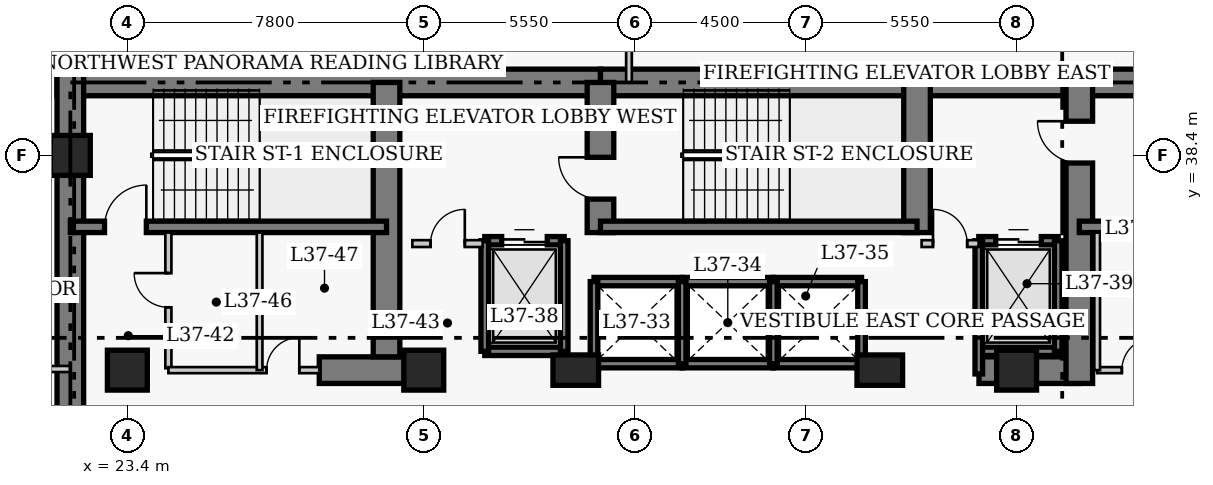
"""IFC4 building model, lengths in metres.
Left out: names, types, materials, properties, quantities, classifications, styles, units other than length and angle.
Written with IfcOpenShell. Run it as: python <this file> out.ifc"""

import sys

from ifc_helpers import new_model, si_unit, direction, frame, frame_2d, origin, origin_2d, place, context, subcontext, project, spatial, rectangle, extrude, element, fill, save


model = new_model("IFC4")
c1 = context("Model", 3, precision=1e-05, world=origin(), true_north=direction((0.0, 1.0)))
c2 = subcontext(c1, "Body", "Model", "MODEL_VIEW")
j1 = project(units=[si_unit("LENGTHUNIT", "METRE"), si_unit("PLANEANGLEUNIT", "RADIAN")], contexts=[c1])
p1 = place(None, origin())
s1 = spatial("IfcSite", under=j1, at=p1, CompositionType="ELEMENT")
p2 = place(p1, origin())
s2 = spatial("IfcBuilding", under=s1, at=p2, CompositionType="ELEMENT")
p3 = place(p2, frame((0.0, 0.0, 149.8)))
s3 = spatial("IfcBuildingStorey", under=s2, at=p3, CompositionType="ELEMENT", Elevation=149.8)
p4 = place(p3, frame((21.55, 40.32, 0.0), z_axis=(0.0, 0.0, 1.0), x_axis=(1.0, 0.0, 0.0)))
e1 = element("IfcWall", 1, at=p4, inside=s3, PredefinedType="SHEAR", context=c2, shape_type="SweptSolid", body=[
    extrude(rectangle(XDim=14.3, YDim=0.7, at=frame_2d((7.15, 0.0))), origin(), (0.0, 0.0, 1.0), 3.8),
])
p5 = place(p3, frame((35.85, 40.32, 0.0), z_axis=(0.0, 0.0, 1.0), x_axis=(1.0, 0.0, 0.0)))
e2 = element("IfcWall", 2, at=p5, inside=s3, PredefinedType="SHEAR", context=c2, shape_type="SweptSolid", body=[
    extrude(rectangle(XDim=12.6, YDim=0.7, at=frame_2d((6.3, 0.0))), origin(), (0.0, 0.0, 1.0), 3.8),
])
p6 = place(p3, frame((48.45, 40.32, 0.0), z_axis=(0.0, 0.0, 1.0), x_axis=(1.0, 0.0, 0.0)))
e3 = element("IfcWall", 3, at=p6, inside=s3, PredefinedType="SHEAR", context=c2, shape_type="SweptSolid", body=[
    extrude(rectangle(XDim=8.77, YDim=0.7, at=frame_2d((4.385, 0.0))), origin(), (0.0, 0.0, 1.0), 3.8),
])
p7 = place(p3, frame((21.9, 27.05, 0.0), z_axis=(0.0, 0.0, 1.0), x_axis=(0.0, 1.0, 0.0)))
e4 = element("IfcWall", 4, at=p7, inside=s3, PredefinedType="SHEAR", context=c2, shape_type="SweptSolid", body=[
    extrude(rectangle(XDim=13.62, YDim=0.7, at=frame_2d((6.81, 0.0))), origin(), (0.0, 0.0, 1.0), 3.8),
])
p8 = place(p3, frame((28.45, 32.75, 0.0), z_axis=(0.0, 0.0, 1.0), x_axis=(1.0, 0.0, 0.0)))
e5 = element("IfcWall", 5, at=p8, inside=s3, PredefinedType="SHEAR", context=c2, shape_type="SweptSolid", body=[
    extrude(rectangle(XDim=2.4, YDim=0.7, at=frame_2d((1.2, 0.0))), origin(), (0.0, 0.0, 1.0), 3.8),
])
p9 = place(p3, frame((45.81, 32.75, 0.0), z_axis=(0.0, 0.0, 1.0), x_axis=(1.0, 0.0, 0.0)))
e6 = element("IfcWall", 6, at=p9, inside=s3, PredefinedType="SHEAR", context=c2, shape_type="SweptSolid", body=[
    extrude(rectangle(XDim=2.64, YDim=0.7, at=frame_2d((1.32, 0.0))), origin(), (0.0, 0.0, 1.0), 3.8),
])
p10 = place(p3, frame((30.22, 33.1, 0.0), z_axis=(0.0, 0.0, 1.0), x_axis=(0.0, 1.0, 0.0)))
e7 = element("IfcWall", 7, at=p10, inside=s3, PredefinedType="SHEAR", context=c2, shape_type="SweptSolid", body=[
    extrude(rectangle(XDim=7.22, YDim=0.7, at=frame_2d((3.61, 0.0))), origin(), (0.0, 0.0, 1.0), 3.8),
])
p11 = place(p3, frame((35.85, 36.37, 0.0), z_axis=(0.0, 0.0, 1.0), x_axis=(0.0, 1.0, 0.0)))
e8 = element("IfcWall", 8, at=p11, inside=s3, PredefinedType="SHEAR", context=c2, shape_type="SweptSolid", body=[
    extrude(rectangle(XDim=3.95, YDim=0.7, at=frame_2d((1.975, 0.0))), origin(), (0.0, 0.0, 1.0), 3.8),
])
p12 = place(p11, frame((0.88, 0.0, 0.0)))
e9 = element("IfcOpeningElement", 9, at=p12, cuts=e8, PredefinedType="OPENING", context=c2, shape_type="SweptSolid", body=[
    extrude(rectangle(XDim=1.1, YDim=2.15, at=frame_2d((0.55, 1.075))), frame((0.0, 0.36, 0.0), z_axis=(0.0, -1.0, 0.0), x_axis=(1.0, 0.0, 0.0)), (0.0, 0.0, 1.0), 0.72),
])
p13 = place(p3, frame((44.18, 36.37, 0.0), z_axis=(0.0, 0.0, 1.0), x_axis=(0.0, 1.0, 0.0)))
e10 = element("IfcWall", 10, at=p13, inside=s3, PredefinedType="SHEAR", context=c2, shape_type="SweptSolid", body=[
    extrude(rectangle(XDim=3.95, YDim=0.7, at=frame_2d((1.975, 0.0))), origin(), (0.0, 0.0, 1.0), 3.8),
])
p14 = place(p3, frame((48.45, 32.4, 0.0), z_axis=(0.0, 0.0, 1.0), x_axis=(0.0, 1.0, 0.0)))
e11 = element("IfcWall", 11, at=p14, inside=s3, PredefinedType="SHEAR", context=c2, shape_type="SweptSolid", body=[
    extrude(rectangle(XDim=7.92, YDim=0.7, at=frame_2d((3.96, 0.0))), origin(), (0.0, 0.0, 1.0), 3.8),
])
p15 = place(p14, frame((5.8, 0.0, 0.0)))
e12 = element("IfcOpeningElement", 12, at=p15, cuts=e11, PredefinedType="OPENING", context=c2, shape_type="SweptSolid", body=[
    extrude(rectangle(XDim=1.1, YDim=2.15, at=frame_2d((0.55, 1.075))), frame((0.0, 0.36, 0.0), z_axis=(0.0, -1.0, 0.0), x_axis=(1.0, 0.0, 0.0)), (0.0, 0.0, 1.0), 0.72),
])
p16 = place(p3, frame((21.9, 36.52, 0.0), z_axis=(0.0, 0.0, 1.0), x_axis=(1.0, 0.0, 0.0)))
e13 = element("IfcWall", 13, at=p16, inside=s3, PredefinedType="SHEAR", context=c2, shape_type="SweptSolid", body=[
    extrude(rectangle(XDim=8.32, YDim=0.3, at=frame_2d((4.16, 0.0))), origin(), (0.0, 0.0, 1.0), 3.8),
])
p17 = place(p16, frame((0.9, 0.0, 0.0)))
e14 = element("IfcOpeningElement", 14, at=p17, cuts=e13, PredefinedType="OPENING", context=c2, shape_type="SweptSolid", body=[
    extrude(rectangle(XDim=1.1, YDim=2.15, at=frame_2d((0.55, 1.075))), frame((0.0, 0.16, 0.0), z_axis=(0.0, -1.0, 0.0), x_axis=(1.0, 0.0, 0.0)), (0.0, 0.0, 1.0), 0.32),
])
p18 = place(p3, frame((35.85, 36.52, 0.0), z_axis=(0.0, 0.0, 1.0), x_axis=(1.0, 0.0, 0.0)))
e15 = element("IfcWall", 15, at=p18, inside=s3, PredefinedType="SHEAR", context=c2, shape_type="SweptSolid", body=[
    extrude(rectangle(XDim=8.33, YDim=0.3, at=frame_2d((4.165, 0.0))), origin(), (0.0, 0.0, 1.0), 3.8),
])
p19 = place(p3, frame((48.45, 36.52, 0.0), z_axis=(0.0, 0.0, 1.0), x_axis=(1.0, 0.0, 0.0)))
e16 = element("IfcWall", 16, at=p19, inside=s3, PredefinedType="SHEAR", context=c2, shape_type="SweptSolid", body=[
    extrude(rectangle(XDim=8.42, YDim=0.3, at=frame_2d((4.21, 0.0))), origin(), (0.0, 0.0, 1.0), 3.8),
])
for number, where, z_axis, x_axis in (
    (17, (21.9, 38.4, 0.0), (0.0, 0.0, 1.0), (1.0, 0.0, 0.0)),
    (18, (23.4, 32.75, 0.0), (0.0, 0.0, 1.0), (1.0, 0.0, 0.0)),
    (19, (31.2, 32.75, 0.0), (0.0, 0.0, 1.0), (1.0, 0.0, 0.0)),
):
    element("IfcColumn", number, at=place(p3, frame(where, z_axis=z_axis, x_axis=x_axis)), inside=s3, PredefinedType="COLUMN", context=c2, shape_type="SweptSolid", body=[
        extrude(rectangle(XDim=1.05, YDim=1.05, at=origin_2d()), origin(), (0.0, 0.0, 1.0), 3.8),
    ])
for number, where, z_axis, x_axis in (
    (20, (35.2, 32.75, 0.0), (0.0, 0.0, 1.0), (1.0, 0.0, 0.0)),
    (21, (43.2, 32.75, 0.0), (0.0, 0.0, 1.0), (1.0, 0.0, 0.0)),
):
    element("IfcColumn", number, at=place(p3, frame(where, z_axis=z_axis, x_axis=x_axis)), inside=s3, PredefinedType="COLUMN", context=c2, shape_type="SweptSolid", body=[
        extrude(rectangle(XDim=1.2, YDim=0.8, at=origin_2d()), origin(), (0.0, 0.0, 1.0), 3.8),
    ])
p20 = place(p3, frame((46.8, 32.75, 0.0), z_axis=(0.0, 0.0, 1.0), x_axis=(1.0, 0.0, 0.0)))
e22 = element("IfcColumn", 22, at=p20, inside=s3, PredefinedType="COLUMN", context=c2, shape_type="SweptSolid", body=[
    extrude(rectangle(XDim=1.05, YDim=1.05, at=origin_2d()), origin(), (0.0, 0.0, 1.0), 3.8),
])
for number, where, z_axis, x_axis in (
    (23, (35.68, 35.08, 0.0), (0.0, 0.0, 1.0), (1.0, 0.0, 0.0)),
    (24, (35.68, 32.92, 0.0), (0.0, 0.0, 1.0), (1.0, 0.0, 0.0)),
):
    element("IfcWall", number, at=place(p3, frame(where, z_axis=z_axis, x_axis=x_axis)), inside=s3, PredefinedType="SHEAR", context=c2, shape_type="SweptSolid", body=[
        extrude(rectangle(XDim=2.32, YDim=0.22, at=frame_2d((1.16, 0.0))), origin(), (0.0, 0.0, 1.0), 3.8),
    ])
p21 = place(p3, frame((35.68, 32.92, 0.0), z_axis=(0.0, 0.0, 1.0), x_axis=(0.0, 1.0, 0.0)))
e25 = element("IfcWall", 25, at=p21, inside=s3, PredefinedType="SHEAR", context=c2, shape_type="SweptSolid", body=[
    extrude(rectangle(XDim=2.16, YDim=0.2, at=frame_2d((1.08, 0.0))), origin(), (0.0, 0.0, 1.0), 3.8),
])
for number, where, z_axis, x_axis in (
    (26, (38.0, 35.08, 0.0), (0.0, 0.0, 1.0), (1.0, 0.0, 0.0)),
    (27, (38.0, 32.92, 0.0), (0.0, 0.0, 1.0), (1.0, 0.0, 0.0)),
):
    element("IfcWall", number, at=place(p3, frame(where, z_axis=z_axis, x_axis=x_axis)), inside=s3, PredefinedType="SHEAR", context=c2, shape_type="SweptSolid", body=[
        extrude(rectangle(XDim=2.4, YDim=0.22, at=frame_2d((1.2, 0.0))), origin(), (0.0, 0.0, 1.0), 3.8),
    ])
p22 = place(p3, frame((38.0, 32.92, 0.0), z_axis=(0.0, 0.0, 1.0), x_axis=(0.0, 1.0, 0.0)))
e28 = element("IfcWall", 28, at=p22, inside=s3, PredefinedType="SHEAR", context=c2, shape_type="SweptSolid", body=[
    extrude(rectangle(XDim=2.16, YDim=0.2, at=frame_2d((1.08, 0.0))), origin(), (0.0, 0.0, 1.0), 3.8),
])
for number, where, z_axis, x_axis in (
    (29, (40.4, 35.08, 0.0), (0.0, 0.0, 1.0), (1.0, 0.0, 0.0)),
    (30, (40.4, 32.92, 0.0), (0.0, 0.0, 1.0), (1.0, 0.0, 0.0)),
):
    element("IfcWall", number, at=place(p3, frame(where, z_axis=z_axis, x_axis=x_axis)), inside=s3, PredefinedType="SHEAR", context=c2, shape_type="SweptSolid", body=[
        extrude(rectangle(XDim=2.32, YDim=0.22, at=frame_2d((1.16, 0.0))), origin(), (0.0, 0.0, 1.0), 3.8),
    ])
for number, where, z_axis, x_axis in (
    (31, (40.4, 32.92, 0.0), (0.0, 0.0, 1.0), (0.0, 1.0, 0.0)),
    (32, (42.72, 32.92, 0.0), (0.0, 0.0, 1.0), (0.0, 1.0, 0.0)),
):
    element("IfcWall", number, at=place(p3, frame(where, z_axis=z_axis, x_axis=x_axis)), inside=s3, PredefinedType="SHEAR", context=c2, shape_type="SweptSolid", body=[
        extrude(rectangle(XDim=2.16, YDim=0.2, at=frame_2d((1.08, 0.0))), origin(), (0.0, 0.0, 1.0), 3.8),
    ])
p23 = place(p3, frame((32.805, 36.155, 0.0), z_axis=(0.0, 0.0, 1.0), x_axis=(1.0, 0.0, 0.0)))
e33 = element("IfcWall", 33, at=p23, inside=s3, PredefinedType="SHEAR", context=c2, shape_type="SweptSolid", body=[
    extrude(rectangle(XDim=2.09, YDim=0.22, at=frame_2d((1.045, 0.0))), origin(), (0.0, 0.0, 1.0), 3.8),
])
p24 = place(p23, frame((0.445, 0.0, 0.0)))
e34 = element("IfcOpeningElement", 34, at=p24, cuts=e33, PredefinedType="OPENING", context=c2, shape_type="SweptSolid", body=[
    extrude(rectangle(XDim=1.2, YDim=2.15, at=frame_2d((0.6, 1.075))), frame((0.0, 0.12, 0.0), z_axis=(0.0, -1.0, 0.0), x_axis=(1.0, 0.0, 0.0)), (0.0, 0.0, 1.0), 0.24),
])
p25 = place(p3, frame((32.805, 33.245, 0.0), z_axis=(0.0, 0.0, 1.0), x_axis=(1.0, 0.0, 0.0)))
e35 = element("IfcWall", 35, at=p25, inside=s3, PredefinedType="SHEAR", context=c2, shape_type="SweptSolid", body=[
    extrude(rectangle(XDim=2.09, YDim=0.22, at=frame_2d((1.045, 0.0))), origin(), (0.0, 0.0, 1.0), 3.8),
])
for number, where, z_axis, x_axis in (
    (36, (32.805, 33.245, 0.0), (0.0, 0.0, 1.0), (0.0, 1.0, 0.0)),
    (37, (34.895, 33.245, 0.0), (0.0, 0.0, 1.0), (0.0, 1.0, 0.0)),
):
    element("IfcWall", number, at=place(p3, frame(where, z_axis=z_axis, x_axis=x_axis)), inside=s3, PredefinedType="SHEAR", context=c2, shape_type="SweptSolid", body=[
        extrude(rectangle(XDim=2.91, YDim=0.2, at=frame_2d((1.455, 0.0))), origin(), (0.0, 0.0, 1.0), 3.8),
    ])
p26 = place(p3, frame((45.805, 36.155, 0.0), z_axis=(0.0, 0.0, 1.0), x_axis=(1.0, 0.0, 0.0)))
e38 = element("IfcWall", 38, at=p26, inside=s3, PredefinedType="SHEAR", context=c2, shape_type="SweptSolid", body=[
    extrude(rectangle(XDim=2.09, YDim=0.22, at=frame_2d((1.045, 0.0))), origin(), (0.0, 0.0, 1.0), 3.8),
])
p27 = place(p26, frame((0.445, 0.0, 0.0)))
e39 = element("IfcOpeningElement", 39, at=p27, cuts=e38, PredefinedType="OPENING", context=c2, shape_type="SweptSolid", body=[
    extrude(rectangle(XDim=1.2, YDim=2.15, at=frame_2d((0.6, 1.075))), frame((0.0, 0.12, 0.0), z_axis=(0.0, -1.0, 0.0), x_axis=(1.0, 0.0, 0.0)), (0.0, 0.0, 1.0), 0.24),
])
p28 = place(p3, frame((45.805, 33.245, 0.0), z_axis=(0.0, 0.0, 1.0), x_axis=(1.0, 0.0, 0.0)))
e40 = element("IfcWall", 40, at=p28, inside=s3, PredefinedType="SHEAR", context=c2, shape_type="SweptSolid", body=[
    extrude(rectangle(XDim=2.09, YDim=0.22, at=frame_2d((1.045, 0.0))), origin(), (0.0, 0.0, 1.0), 3.8),
])
p29 = place(p3, frame((45.805, 32.65, 0.0), z_axis=(0.0, 0.0, 1.0), x_axis=(0.0, 1.0, 0.0)))
e41 = element("IfcWall", 41, at=p29, inside=s3, PredefinedType="SHEAR", context=c2, shape_type="SweptSolid", body=[
    extrude(rectangle(XDim=3.505, YDim=0.2, at=frame_2d((1.752, 0.0))), origin(), (0.0, 0.0, 1.0), 3.8),
])
p30 = place(p3, frame((47.895, 33.245, 0.0), z_axis=(0.0, 0.0, 1.0), x_axis=(0.0, 1.0, 0.0)))
e42 = element("IfcWall", 42, at=p30, inside=s3, PredefinedType="SHEAR", context=c2, shape_type="SweptSolid", body=[
    extrude(rectangle(XDim=2.91, YDim=0.2, at=frame_2d((1.455, 0.0))), origin(), (0.0, 0.0, 1.0), 3.8),
])
p31 = place(p3, frame((30.9, 36.08, 0.0), z_axis=(0.0, 0.0, 1.0), x_axis=(1.0, 0.0, 0.0)))
e43 = element("IfcWall", 43, at=p31, inside=s3, PredefinedType="PARTITIONING", context=c2, shape_type="SweptSolid", body=[
    extrude(rectangle(XDim=1.85, YDim=0.18, at=frame_2d((0.925, 0.0))), origin(), (0.0, 0.0, 1.0), 3.55),
])
p32 = place(p31, frame((0.48, 0.0, 0.0)))
e44 = element("IfcOpeningElement", 44, at=p32, cuts=e43, PredefinedType="OPENING", context=c2, shape_type="SweptSolid", body=[
    extrude(rectangle(XDim=0.9, YDim=2.15, at=frame_2d((0.45, 1.075))), frame((0.0, 0.1, 0.0), z_axis=(0.0, -1.0, 0.0), x_axis=(1.0, 0.0, 0.0)), (0.0, 0.0, 1.0), 0.2),
])
p33 = place(p3, frame((44.3, 36.08, 0.0), z_axis=(0.0, 0.0, 1.0), x_axis=(1.0, 0.0, 0.0)))
e45 = element("IfcWall", 45, at=p33, inside=s3, PredefinedType="PARTITIONING", context=c2, shape_type="SweptSolid", body=[
    extrude(rectangle(XDim=1.5, YDim=0.18, at=frame_2d((0.75, 0.0))), origin(), (0.0, 0.0, 1.0), 3.55),
])
p34 = place(p33, frame((0.3, 0.0, 0.0)))
e46 = element("IfcOpeningElement", 46, at=p34, cuts=e45, PredefinedType="OPENING", context=c2, shape_type="SweptSolid", body=[
    extrude(rectangle(XDim=0.9, YDim=2.15, at=frame_2d((0.45, 1.075))), frame((0.0, 0.1, 0.0), z_axis=(0.0, -1.0, 0.0), x_axis=(1.0, 0.0, 0.0)), (0.0, 0.0, 1.0), 0.2),
])
p35 = place(p3, frame((24.48, 32.8, 0.0), z_axis=(0.0, 0.0, 1.0), x_axis=(0.0, 1.0, 0.0)))
e47 = element("IfcWall", 47, at=p35, inside=s3, PredefinedType="PARTITIONING", context=c2, shape_type="SweptSolid", body=[
    extrude(rectangle(XDim=3.57, YDim=0.16, at=frame_2d((1.785, 0.0))), origin(), (0.0, 0.0, 1.0), 3.55),
])
p36 = place(p35, frame((1.604, 0.0, 0.0)))
e48 = element("IfcOpeningElement", 48, at=p36, cuts=e47, PredefinedType="OPENING", context=c2, shape_type="SweptSolid", body=[
    extrude(rectangle(XDim=0.9, YDim=2.1, at=frame_2d((0.45, 1.05))), frame((0.0, 0.09, 0.0), z_axis=(0.0, -1.0, 0.0), x_axis=(1.0, 0.0, 0.0)), (0.0, 0.0, 1.0), 0.18),
])
p37 = place(p3, frame((24.48, 32.75, 0.0), z_axis=(0.0, 0.0, 1.0), x_axis=(1.0, 0.0, 0.0)))
e49 = element("IfcWall", 49, at=p37, inside=s3, PredefinedType="PARTITIONING", context=c2, shape_type="SweptSolid", body=[
    extrude(rectangle(XDim=3.97, YDim=0.16, at=frame_2d((1.985, 0.0))), origin(), (0.0, 0.0, 1.0), 3.55),
])
p38 = place(p37, frame((2.585, 0.0, 0.0)))
e50 = element("IfcOpeningElement", 50, at=p38, cuts=e49, PredefinedType="OPENING", context=c2, shape_type="SweptSolid", body=[
    extrude(rectangle(XDim=0.86, YDim=2.05, at=frame_2d((0.43, 1.025))), frame((0.0, 0.09, 0.0), z_axis=(0.0, -1.0, 0.0), x_axis=(1.0, 0.0, 0.0)), (0.0, 0.0, 1.0), 0.18),
])
p39 = place(p3, frame((48.92, 32.75, 0.0), z_axis=(0.0, 0.0, 1.0), x_axis=(1.0, 0.0, 0.0)))
e51 = element("IfcWall", 51, at=p39, inside=s3, PredefinedType="PARTITIONING", context=c2, shape_type="SweptSolid", body=[
    extrude(rectangle(XDim=2.2, YDim=0.16, at=frame_2d((1.1, 0.0))), origin(), (0.0, 0.0, 1.0), 3.55),
])
p40 = place(p39, frame((0.65, 0.0, 0.0)))
e52 = element("IfcOpeningElement", 52, at=p40, cuts=e51, PredefinedType="OPENING", context=c2, shape_type="SweptSolid", body=[
    extrude(rectangle(XDim=0.86, YDim=2.05, at=frame_2d((0.43, 1.025))), frame((0.0, 0.09, 0.0), z_axis=(0.0, -1.0, 0.0), x_axis=(1.0, 0.0, 0.0)), (0.0, 0.0, 1.0), 0.18),
])
for number, where, z_axis, x_axis in (
    (53, (48.92, 32.75, 0.0), (0.0, 0.0, 1.0), (0.0, 1.0, 0.0)),
    (54, (26.88, 32.75, 0.0), (0.0, 0.0, 1.0), (0.0, 1.0, 0.0)),
):
    element("IfcWall", number, at=place(p3, frame(where, z_axis=z_axis, x_axis=x_axis)), inside=s3, PredefinedType="PARTITIONING", context=c2, shape_type="SweptSolid", body=[
        extrude(rectangle(XDim=3.62, YDim=0.15, at=frame_2d((1.81, 0.0))), origin(), (0.0, 0.0, 1.0), 3.55),
    ])
for number, where, z_axis, x_axis in (
    (55, (18.86, 35.02, 0.0), (0.0, 0.0, 1.0), (1.0, 0.0, 0.0)),
    (56, (18.86, 32.78, 0.0), (0.0, 0.0, 1.0), (1.0, 0.0, 0.0)),
):
    element("IfcWall", number, at=place(p3, frame(where, z_axis=z_axis, x_axis=x_axis)), inside=s3, PredefinedType="PARTITIONING", context=c2, shape_type="SweptSolid", body=[
        extrude(rectangle(XDim=3.04, YDim=0.16, at=frame_2d((1.52, 0.0))), origin(), (0.0, 0.0, 1.0), 3.55),
    ])
p41 = place(p3, frame((16.64, 40.65, 0.0), z_axis=(0.0, 0.0, 1.0), x_axis=(1.0, 0.0, 0.0)))
e57 = element("IfcWall", 57, at=p41, inside=s3, PredefinedType="PARTITIONING", context=c2, shape_type="SweptSolid", body=[
    extrude(rectangle(XDim=5.46, YDim=0.15, at=frame_2d((2.73, 0.0))), origin(), (0.0, 0.0, 1.0), 3.55),
])
p42 = place(p41, frame((0.55, 0.0, 0.0)))
e58 = element("IfcOpeningElement", 58, at=p42, cuts=e57, PredefinedType="OPENING", context=c2, shape_type="SweptSolid", body=[
    extrude(rectangle(XDim=1.0, YDim=2.15, at=frame_2d((0.5, 1.075))), frame((0.0, 0.085, 0.0), z_axis=(0.0, -1.0, 0.0), x_axis=(1.0, 0.0, 0.0)), (0.0, 0.0, 1.0), 0.17),
])
p43 = place(p3, frame((36.6, 40.32, 0.0), z_axis=(0.0, 0.0, 1.0), x_axis=(0.0, 1.0, 0.0)))
e59 = element("IfcWall", 59, at=p43, inside=s3, PredefinedType="PARTITIONING", context=c2, shape_type="SweptSolid", body=[
    extrude(rectangle(XDim=1.845, YDim=0.15, at=frame_2d((0.922, 0.0))), origin(), (0.0, 0.0, 1.0), 3.55),
])
p44 = place(p24, origin())
e60 = element("IfcDoor", 60, at=p44, inside=s3, OperationType="DOUBLE_DOOR_SLIDING", PredefinedType="DOOR", context=c2, shape_type="SweptSolid", body=[
    extrude(rectangle(XDim=1.2, YDim=2.15, at=frame_2d((0.6, 1.075))), frame((0.0, 0.025, 0.0), z_axis=(0.0, -1.0, 0.0), x_axis=(1.0, 0.0, 0.0)), (0.0, 0.0, 1.0), 0.05),
])
fill(e34, e60)
p45 = place(p27, origin())
e61 = element("IfcDoor", 61, at=p45, inside=s3, OperationType="DOUBLE_DOOR_SLIDING", PredefinedType="DOOR", context=c2, shape_type="SweptSolid", body=[
    extrude(rectangle(XDim=1.2, YDim=2.15, at=frame_2d((0.6, 1.075))), frame((0.0, 0.025, 0.0), z_axis=(0.0, -1.0, 0.0), x_axis=(1.0, 0.0, 0.0)), (0.0, 0.0, 1.0), 0.05),
])
fill(e39, e61)
p46 = place(p32, origin())
e62 = element("IfcDoor", 62, at=p46, inside=s3, OperationType="SINGLE_SWING_RIGHT", PredefinedType="DOOR", context=c2, shape_type="SweptSolid", body=[
    extrude(rectangle(XDim=0.9, YDim=2.15, at=frame_2d((0.45, 1.075))), frame((0.0, 0.025, 0.0), z_axis=(0.0, -1.0, 0.0), x_axis=(1.0, 0.0, 0.0)), (0.0, 0.0, 1.0), 0.05),
])
fill(e44, e62)
p47 = place(p34, origin())
e63 = element("IfcDoor", 63, at=p47, inside=s3, OperationType="SINGLE_SWING_LEFT", PredefinedType="DOOR", context=c2, shape_type="SweptSolid", body=[
    extrude(rectangle(XDim=0.9, YDim=2.15, at=frame_2d((0.45, 1.075))), frame((0.0, 0.025, 0.0), z_axis=(0.0, -1.0, 0.0), x_axis=(1.0, 0.0, 0.0)), (0.0, 0.0, 1.0), 0.05),
])
fill(e46, e63)
p48 = place(p36, origin())
e64 = element("IfcDoor", 64, at=p48, inside=s3, OperationType="SINGLE_SWING_RIGHT", PredefinedType="DOOR", context=c2, shape_type="SweptSolid", body=[
    extrude(rectangle(XDim=0.9, YDim=2.1, at=frame_2d((0.45, 1.05))), frame((0.0, 0.025, 0.0), z_axis=(0.0, -1.0, 0.0), x_axis=(1.0, 0.0, 0.0)), (0.0, 0.0, 1.0), 0.05),
])
fill(e48, e64)
p49 = place(p38, origin())
e65 = element("IfcDoor", 65, at=p49, inside=s3, OperationType="SINGLE_SWING_RIGHT", PredefinedType="DOOR", context=c2, shape_type="SweptSolid", body=[
    extrude(rectangle(XDim=0.86, YDim=2.05, at=frame_2d((0.43, 1.025))), frame((0.0, 0.025, 0.0), z_axis=(0.0, -1.0, 0.0), x_axis=(1.0, 0.0, 0.0)), (0.0, 0.0, 1.0), 0.05),
])
fill(e50, e65)
p50 = place(p40, origin())
e66 = element("IfcDoor", 66, at=p50, inside=s3, OperationType="SINGLE_SWING_RIGHT", PredefinedType="DOOR", context=c2, shape_type="SweptSolid", body=[
    extrude(rectangle(XDim=0.86, YDim=2.05, at=frame_2d((0.43, 1.025))), frame((0.0, 0.025, 0.0), z_axis=(0.0, -1.0, 0.0), x_axis=(1.0, 0.0, 0.0)), (0.0, 0.0, 1.0), 0.05),
])
fill(e52, e66)
p51 = place(p17, origin())
e67 = element("IfcDoor", 67, at=p51, inside=s3, OperationType="SINGLE_SWING_RIGHT", PredefinedType="DOOR", context=c2, shape_type="SweptSolid", body=[
    extrude(rectangle(XDim=1.1, YDim=2.15, at=frame_2d((0.55, 1.075))), frame((0.0, 0.025, 0.0), z_axis=(0.0, -1.0, 0.0), x_axis=(1.0, 0.0, 0.0)), (0.0, 0.0, 1.0), 0.05),
])
fill(e14, e67)
p52 = place(p12, origin())
e68 = element("IfcDoor", 68, at=p52, inside=s3, OperationType="SINGLE_SWING_RIGHT", PredefinedType="DOOR", context=c2, shape_type="SweptSolid", body=[
    extrude(rectangle(XDim=1.1, YDim=2.15, at=frame_2d((0.55, 1.075))), frame((0.0, 0.025, 0.0), z_axis=(0.0, -1.0, 0.0), x_axis=(1.0, 0.0, 0.0)), (0.0, 0.0, 1.0), 0.05),
])
fill(e9, e68)
p53 = place(p15, origin())
e69 = element("IfcDoor", 69, at=p53, inside=s3, OperationType="SINGLE_SWING_RIGHT", PredefinedType="DOOR", context=c2, shape_type="SweptSolid", body=[
    extrude(rectangle(XDim=1.1, YDim=2.15, at=frame_2d((0.55, 1.075))), frame((0.0, 0.025, 0.0), z_axis=(0.0, -1.0, 0.0), x_axis=(1.0, 0.0, 0.0)), (0.0, 0.0, 1.0), 0.05),
])
fill(e12, e69)
save(model, sys.argv[1])
